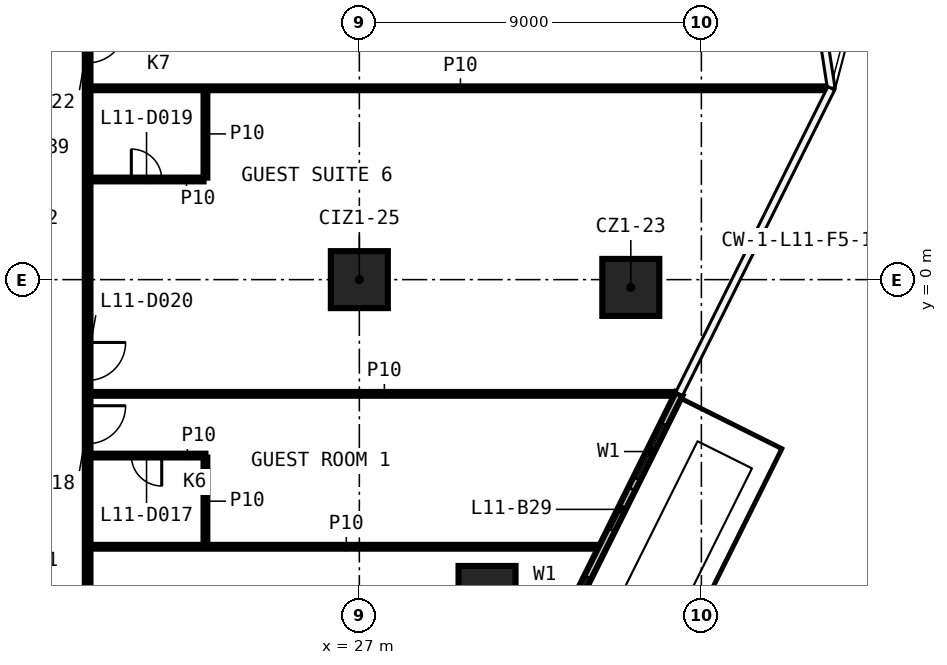
"""IFC4 building model, lengths in metres.
Left out: names, types, materials, properties, quantities, classifications, styles, units other than length and angle.
Written with IfcOpenShell. Run it as: python <this file> out.ifc"""

import sys

from ifc_helpers import new_model, si_unit, direction, frame, frame_2d, origin, origin_2d, place, context, subcontext, project, spatial, rectangle, extrude, element, fill, save


model = new_model("IFC4")
c1 = context("Model", 3, precision=1e-05, world=origin(), true_north=direction((0.0, 1.0)))
c2 = subcontext(c1, "Body", "Model", "MODEL_VIEW")
j1 = project(units=[si_unit("LENGTHUNIT", "METRE"), si_unit("PLANEANGLEUNIT", "RADIAN")], contexts=[c1])
p1 = place(None, origin())
s1 = spatial("IfcSite", under=j1, at=p1, CompositionType="ELEMENT")
p2 = place(p1, origin())
s2 = spatial("IfcBuilding", under=s1, at=p2, CompositionType="ELEMENT")
p3 = place(p2, frame((0.0, 0.0, 62.5)))
s3 = spatial("IfcBuildingStorey", under=s2, at=p3, CompositionType="ELEMENT", Elevation=62.5)
for number, where, z_axis, x_axis in (
    (1, (34.143, -0.205, 0.0), (0.0, 0.0, 1.0), (1.0, 0.0, 0.0)),
    (2, (30.36, -8.284, 0.0), (0.0, 0.0, 1.0), (1.0, 0.0, 0.0)),
    (3, (27.0, 0.0, 0.0), (0.0, 0.0, 1.0), (1.0, 0.0, 0.0)),
):
    element("IfcColumn", number, at=place(p3, frame(where, z_axis=z_axis, x_axis=x_axis)), inside=s3, PredefinedType="COLUMN", context=c2, shape_type="SweptSolid", body=[
        extrude(rectangle(XDim=1.5, YDim=1.5, at=origin_2d()), origin(), (0.0, 0.0, 1.0), 3.3),
    ])
p4 = place(p3, frame((19.925, -7.03, 0.0), z_axis=(0.0, 0.0, 1.0), x_axis=(1.0, 0.0, 0.0)))
e4 = element("IfcWall", 4, at=p4, inside=s3, PredefinedType="PARTITIONING", context=c2, shape_type="SweptSolid", body=[
    extrude(rectangle(XDim=13.464, YDim=0.1, at=frame_2d((6.732, 0.0))), origin(), (0.0, 0.0, 1.0), 3.3),
])
p5 = place(p3, frame((22.95, -4.63, 0.0), z_axis=(0.0, 0.0, 1.0), x_axis=(-1.0, 0.0, 0.0)))
e5 = element("IfcWall", 5, at=p5, inside=s3, PredefinedType="PARTITIONING", context=c2, shape_type="SweptSolid", body=[
    extrude(rectangle(XDim=3.025, YDim=0.1, at=frame_2d((1.512, 0.0))), origin(), (0.0, 0.0, 1.0), 3.3),
])
p6 = place(p5, frame((1.15, 0.0, 0.0)))
e6 = element("IfcOpeningElement", 6, at=p6, cuts=e5, PredefinedType="OPENING", context=c2, shape_type="SweptSolid", body=[
    extrude(rectangle(XDim=0.8, YDim=2.1, at=frame_2d((0.4, 1.05))), frame((0.0, 0.06, 0.0), z_axis=(0.0, -1.0, 0.0), x_axis=(1.0, 0.0, 0.0)), (0.0, 0.0, 1.0), 0.12),
])
p7 = place(p3, frame((19.925, -3.006, 0.0), z_axis=(0.0, 0.0, 1.0), x_axis=(1.0, 0.0, 0.0)))
e7 = element("IfcWall", 7, at=p7, inside=s3, PredefinedType="PARTITIONING", context=c2, shape_type="SweptSolid", body=[
    extrude(rectangle(XDim=15.467, YDim=0.1, at=frame_2d((7.733, 0.0))), origin(), (0.0, 0.0, 1.0), 3.3),
])
p8 = place(p3, frame((19.925, 2.635, 0.0), z_axis=(0.0, 0.0, 1.0), x_axis=(1.0, 0.0, 0.0)))
e8 = element("IfcWall", 8, at=p8, inside=s3, PredefinedType="PARTITIONING", context=c2, shape_type="SweptSolid", body=[
    extrude(rectangle(XDim=2.975, YDim=0.1, at=frame_2d((1.487, 0.0))), origin(), (0.0, 0.0, 1.0), 3.3),
])
p9 = place(p8, frame((1.075, 0.0, 0.0)))
e9 = element("IfcOpeningElement", 9, at=p9, cuts=e8, PredefinedType="OPENING", context=c2, shape_type="SweptSolid", body=[
    extrude(rectangle(XDim=0.8, YDim=2.1, at=frame_2d((0.4, 1.05))), frame((0.0, 0.06, 0.0), z_axis=(0.0, -1.0, 0.0), x_axis=(1.0, 0.0, 0.0)), (0.0, 0.0, 1.0), 0.12),
])
p10 = place(p3, frame((19.925, 5.035, 0.0), z_axis=(0.0, 0.0, 1.0), x_axis=(1.0, 0.0, 0.0)))
e10 = element("IfcWall", 10, at=p10, inside=s3, PredefinedType="PARTITIONING", context=c2, shape_type="SweptSolid", body=[
    extrude(rectangle(XDim=19.47, YDim=0.1, at=frame_2d((9.735, 0.0))), origin(), (0.0, 0.0, 1.0), 3.3),
])
p11 = place(p3, frame((22.95, -6.98, 0.0), z_axis=(0.0, 0.0, 1.0), x_axis=(0.0, 1.0, 0.0)))
e11 = element("IfcWall", 11, at=p11, inside=s3, PredefinedType="PARTITIONING", context=c2, shape_type="SweptSolid", body=[
    extrude(rectangle(XDim=2.3, YDim=0.1, at=frame_2d((1.15, 0.0))), origin(), (0.0, 0.0, 1.0), 3.3),
])
p12 = place(p3, frame((22.95, 2.685, 0.0), z_axis=(0.0, 0.0, 1.0), x_axis=(0.0, 1.0, 0.0)))
e12 = element("IfcWall", 12, at=p12, inside=s3, PredefinedType="PARTITIONING", context=c2, shape_type="SweptSolid", body=[
    extrude(rectangle(XDim=2.3, YDim=0.1, at=frame_2d((1.15, 0.0))), origin(), (0.0, 0.0, 1.0), 3.3),
])
p13 = place(p3, frame((19.85, 16.775, 0.0), z_axis=(0.0, 0.0, 1.0), x_axis=(0.0, -1.0, 0.0)))
e13 = element("IfcWall", 13, at=p13, inside=s3, PredefinedType="PARTITIONING", context=c2, shape_type="SweptSolid", body=[
    extrude(rectangle(XDim=33.55, YDim=0.15, at=frame_2d((16.775, 0.0))), origin(), (0.0, 0.0, 1.0), 3.3),
])
p14 = place(p13, frame((32.158, 0.0, 0.0)))
e14 = element("IfcOpeningElement", 14, at=p14, cuts=e13, PredefinedType="OPENING", context=c2, shape_type="SweptSolid", body=[
    extrude(rectangle(XDim=1.0, YDim=2.1, at=frame_2d((0.5, 1.05))), frame((0.0, 0.085, 0.0), z_axis=(0.0, -1.0, 0.0), x_axis=(1.0, 0.0, 0.0)), (0.0, 0.0, 1.0), 0.17),
])
p15 = place(p13, frame((20.094, 0.0, 0.0)))
e15 = element("IfcOpeningElement", 15, at=p15, cuts=e13, PredefinedType="OPENING", context=c2, shape_type="SweptSolid", body=[
    extrude(rectangle(XDim=1.0, YDim=2.1, at=frame_2d((0.5, 1.05))), frame((0.0, 0.085, 0.0), z_axis=(0.0, -1.0, 0.0), x_axis=(1.0, 0.0, 0.0)), (0.0, 0.0, 1.0), 0.17),
])
p16 = place(p13, frame((18.428, 0.0, 0.0)))
e16 = element("IfcOpeningElement", 16, at=p16, cuts=e13, PredefinedType="OPENING", context=c2, shape_type="SweptSolid", body=[
    extrude(rectangle(XDim=1.0, YDim=2.1, at=frame_2d((0.5, 1.05))), frame((0.0, 0.085, 0.0), z_axis=(0.0, -1.0, 0.0), x_axis=(1.0, 0.0, 0.0)), (0.0, 0.0, 1.0), 0.17),
])
p17 = place(p13, frame((10.072, 0.0, 0.0)))
e17 = element("IfcOpeningElement", 17, at=p17, cuts=e13, PredefinedType="OPENING", context=c2, shape_type="SweptSolid", body=[
    extrude(rectangle(XDim=1.0, YDim=2.1, at=frame_2d((0.5, 1.05))), frame((0.0, 0.085, 0.0), z_axis=(0.0, -1.0, 0.0), x_axis=(1.0, 0.0, 0.0)), (0.0, 0.0, 1.0), 0.17),
])
p18 = place(p13, frame((3.156, 0.0, 0.0)))
e18 = element("IfcOpeningElement", 18, at=p18, cuts=e13, PredefinedType="OPENING", context=c2, shape_type="SweptSolid", body=[
    extrude(rectangle(XDim=1.0, YDim=2.1, at=frame_2d((0.5, 1.05))), frame((0.0, 0.085, 0.0), z_axis=(0.0, -1.0, 0.0), x_axis=(1.0, 0.0, 0.0)), (0.0, 0.0, 1.0), 0.17),
])
p19 = place(p3, frame((21.391, -31.175, 0.0), z_axis=(0.0, 0.0, 1.0), x_axis=(0.445673586032, 0.895195539932, 0.0)))
e19 = element("IfcWall", 19, at=p19, inside=s3, PredefinedType="SOLIDWALL", context=c2, shape_type="SweptSolid", body=[
    extrude(rectangle(XDim=31.466, YDim=0.2, at=frame_2d((15.733, 0.0))), origin(), (0.0, 0.0, 1.0), 3.3),
])
p20 = place(p19, frame((2.0, 0.0, 0.6)))
e20 = element("IfcOpeningElement", 20, at=p20, cuts=e19, PredefinedType="OPENING", context=c2, shape_type="SweptSolid", body=[
    extrude(rectangle(XDim=1.6, YDim=2.4, at=frame_2d((0.8, 1.2))), frame((0.0, 0.11, 0.0), z_axis=(0.0, -1.0, 0.0), x_axis=(1.0, 0.0, 0.0)), (0.0, 0.0, 1.0), 0.22),
])
p21 = place(p19, frame((0.5, 0.0, 0.0)))
e21 = element("IfcOpeningElement", 21, at=p21, cuts=e19, PredefinedType="OPENING", context=c2, shape_type="SweptSolid", body=[
    extrude(rectangle(XDim=1.2, YDim=2.4, at=frame_2d((0.6, 1.2))), frame((0.0, 0.11, 0.0), z_axis=(0.0, -1.0, 0.0), x_axis=(1.0, 0.0, 0.0)), (0.0, 0.0, 1.0), 0.22),
])
p22 = place(p19, frame((4.995, 0.0, 0.6)))
e22 = element("IfcOpeningElement", 22, at=p22, cuts=e19, PredefinedType="OPENING", context=c2, shape_type="SweptSolid", body=[
    extrude(rectangle(XDim=1.6, YDim=2.4, at=frame_2d((0.8, 1.2))), frame((0.0, 0.11, 0.0), z_axis=(0.0, -1.0, 0.0), x_axis=(1.0, 0.0, 0.0)), (0.0, 0.0, 1.0), 0.22),
])
p23 = place(p19, frame((7.495, 0.0, 0.0)))
e23 = element("IfcOpeningElement", 23, at=p23, cuts=e19, PredefinedType="OPENING", context=c2, shape_type="SweptSolid", body=[
    extrude(rectangle(XDim=1.2, YDim=2.4, at=frame_2d((0.6, 1.2))), frame((0.0, 0.11, 0.0), z_axis=(0.0, -1.0, 0.0), x_axis=(1.0, 0.0, 0.0)), (0.0, 0.0, 1.0), 0.22),
])
p24 = place(p19, frame((10.99, 0.0, 0.6)))
e24 = element("IfcOpeningElement", 24, at=p24, cuts=e19, PredefinedType="OPENING", context=c2, shape_type="SweptSolid", body=[
    extrude(rectangle(XDim=1.6, YDim=2.4, at=frame_2d((0.8, 1.2))), frame((0.0, 0.11, 0.0), z_axis=(0.0, -1.0, 0.0), x_axis=(1.0, 0.0, 0.0)), (0.0, 0.0, 1.0), 0.22),
])
p25 = place(p19, frame((9.49, 0.0, 0.0)))
e25 = element("IfcOpeningElement", 25, at=p25, cuts=e19, PredefinedType="OPENING", context=c2, shape_type="SweptSolid", body=[
    extrude(rectangle(XDim=1.2, YDim=2.4, at=frame_2d((0.6, 1.2))), frame((0.0, 0.11, 0.0), z_axis=(0.0, -1.0, 0.0), x_axis=(1.0, 0.0, 0.0)), (0.0, 0.0, 1.0), 0.22),
])
p26 = place(p19, frame((13.986, 0.0, 0.6)))
e26 = element("IfcOpeningElement", 26, at=p26, cuts=e19, PredefinedType="OPENING", context=c2, shape_type="SweptSolid", body=[
    extrude(rectangle(XDim=1.6, YDim=2.4, at=frame_2d((0.8, 1.2))), frame((0.0, 0.11, 0.0), z_axis=(0.0, -1.0, 0.0), x_axis=(1.0, 0.0, 0.0)), (0.0, 0.0, 1.0), 0.22),
])
p27 = place(p19, frame((16.085, 0.0, 0.0)))
e27 = element("IfcOpeningElement", 27, at=p27, cuts=e19, PredefinedType="OPENING", context=c2, shape_type="SweptSolid", body=[
    extrude(rectangle(XDim=1.2, YDim=2.4, at=frame_2d((0.6, 1.2))), frame((0.0, 0.11, 0.0), z_axis=(0.0, -1.0, 0.0), x_axis=(1.0, 0.0, 0.0)), (0.0, 0.0, 1.0), 0.22),
])
p28 = place(p19, frame((19.981, 0.0, 0.6)))
e28 = element("IfcOpeningElement", 28, at=p28, cuts=e19, PredefinedType="OPENING", context=c2, shape_type="SweptSolid", body=[
    extrude(rectangle(XDim=1.6, YDim=2.4, at=frame_2d((0.8, 1.2))), frame((0.0, 0.11, 0.0), z_axis=(0.0, -1.0, 0.0), x_axis=(1.0, 0.0, 0.0)), (0.0, 0.0, 1.0), 0.22),
])
p29 = place(p19, frame((18.481, 0.0, 0.0)))
e29 = element("IfcOpeningElement", 29, at=p29, cuts=e19, PredefinedType="OPENING", context=c2, shape_type="SweptSolid", body=[
    extrude(rectangle(XDim=1.2, YDim=2.4, at=frame_2d((0.6, 1.2))), frame((0.0, 0.11, 0.0), z_axis=(0.0, -1.0, 0.0), x_axis=(1.0, 0.0, 0.0)), (0.0, 0.0, 1.0), 0.22),
])
p30 = place(p19, frame((24.476, 0.0, 0.6)))
e30 = element("IfcOpeningElement", 30, at=p30, cuts=e19, PredefinedType="OPENING", context=c2, shape_type="SweptSolid", body=[
    extrude(rectangle(XDim=1.6, YDim=2.4, at=frame_2d((0.8, 1.2))), frame((0.0, 0.11, 0.0), z_axis=(0.0, -1.0, 0.0), x_axis=(1.0, 0.0, 0.0)), (0.0, 0.0, 1.0), 0.22),
])
p31 = place(p19, frame((22.776, 0.0, 0.0)))
e31 = element("IfcOpeningElement", 31, at=p31, cuts=e19, PredefinedType="OPENING", context=c2, shape_type="SweptSolid", body=[
    extrude(rectangle(XDim=1.2, YDim=2.4, at=frame_2d((0.6, 1.2))), frame((0.0, 0.11, 0.0), z_axis=(0.0, -1.0, 0.0), x_axis=(1.0, 0.0, 0.0)), (0.0, 0.0, 1.0), 0.22),
])
p32 = place(p19, frame((28.971, 0.0, 0.6)))
e32 = element("IfcOpeningElement", 32, at=p32, cuts=e19, PredefinedType="OPENING", context=c2, shape_type="SweptSolid", body=[
    extrude(rectangle(XDim=1.6, YDim=2.4, at=frame_2d((0.8, 1.2))), frame((0.0, 0.11, 0.0), z_axis=(0.0, -1.0, 0.0), x_axis=(1.0, 0.0, 0.0)), (0.0, 0.0, 1.0), 0.22),
])
p33 = place(p19, frame((27.471, 0.0, 0.0)))
e33 = element("IfcOpeningElement", 33, at=p33, cuts=e19, PredefinedType="OPENING", context=c2, shape_type="SweptSolid", body=[
    extrude(rectangle(XDim=1.2, YDim=2.4, at=frame_2d((0.6, 1.2))), frame((0.0, 0.11, 0.0), z_axis=(0.0, -1.0, 0.0), x_axis=(1.0, 0.0, 0.0)), (0.0, 0.0, 1.0), 0.22),
])
p34 = place(p6, origin())
e34 = element("IfcDoor", 34, at=p34, inside=s3, OperationType="SINGLE_SWING_LEFT", PredefinedType="DOOR", context=c2, shape_type="SweptSolid", body=[
    extrude(rectangle(XDim=0.8, YDim=2.1, at=frame_2d((0.4, 1.05))), frame((0.0, 0.025, 0.0), z_axis=(0.0, -1.0, 0.0), x_axis=(1.0, 0.0, 0.0)), (0.0, 0.0, 1.0), 0.05),
])
fill(e6, e34)
p35 = place(p15, origin())
e35 = element("IfcDoor", 35, at=p35, inside=s3, OperationType="SINGLE_SWING_RIGHT", PredefinedType="DOOR", context=c2, shape_type="SweptSolid", body=[
    extrude(rectangle(XDim=1.0, YDim=2.1, at=frame_2d((0.5, 1.05))), frame((0.0, 0.025, 0.0), z_axis=(0.0, -1.0, 0.0), x_axis=(1.0, 0.0, 0.0)), (0.0, 0.0, 1.0), 0.05),
])
fill(e15, e35)
p36 = place(p9, origin())
e36 = element("IfcDoor", 36, at=p36, inside=s3, OperationType="SINGLE_SWING_RIGHT", PredefinedType="DOOR", context=c2, shape_type="SweptSolid", body=[
    extrude(rectangle(XDim=0.8, YDim=2.1, at=frame_2d((0.4, 1.05))), frame((0.0, 0.025, 0.0), z_axis=(0.0, -1.0, 0.0), x_axis=(1.0, 0.0, 0.0)), (0.0, 0.0, 1.0), 0.05),
])
fill(e9, e36)
p37 = place(p16, origin())
e37 = element("IfcDoor", 37, at=p37, inside=s3, OperationType="SINGLE_SWING_LEFT", PredefinedType="DOOR", context=c2, shape_type="SweptSolid", body=[
    extrude(rectangle(XDim=1.0, YDim=2.1, at=frame_2d((0.5, 1.05))), frame((0.0, 0.025, 0.0), z_axis=(0.0, -1.0, 0.0), x_axis=(1.0, 0.0, 0.0)), (0.0, 0.0, 1.0), 0.05),
])
fill(e16, e37)
p38 = place(p17, origin())
e38 = element("IfcDoor", 38, at=p38, inside=s3, OperationType="SINGLE_SWING_RIGHT", PredefinedType="DOOR", context=c2, shape_type="SweptSolid", body=[
    extrude(rectangle(XDim=1.0, YDim=2.1, at=frame_2d((0.5, 1.05))), frame((0.0, 0.025, 0.0), z_axis=(0.0, -1.0, 0.0), x_axis=(1.0, 0.0, 0.0)), (0.0, 0.0, 1.0), 0.05),
])
fill(e17, e38)
p39 = place(p30, origin())
e39 = element("IfcWindow", 39, at=p39, inside=s3, PartitioningType="SINGLE_PANEL", PredefinedType="WINDOW", context=c2, shape_type="SweptSolid", body=[
    extrude(rectangle(XDim=1.6, YDim=2.4, at=frame_2d((0.8, 1.2))), frame((0.0, 0.03, 0.0), z_axis=(0.0, -1.0, 0.0), x_axis=(1.0, 0.0, 0.0)), (0.0, 0.0, 1.0), 0.06),
])
fill(e30, e39)
p40 = place(p32, origin())
e40 = element("IfcWindow", 40, at=p40, inside=s3, PartitioningType="SINGLE_PANEL", PredefinedType="WINDOW", context=c2, shape_type="SweptSolid", body=[
    extrude(rectangle(XDim=1.6, YDim=2.4, at=frame_2d((0.8, 1.2))), frame((0.0, 0.03, 0.0), z_axis=(0.0, -1.0, 0.0), x_axis=(1.0, 0.0, 0.0)), (0.0, 0.0, 1.0), 0.06),
])
fill(e32, e40)
p41 = place(p33, origin())
e41 = element("IfcDoor", 41, at=p41, inside=s3, OperationType="SLIDING_TO_LEFT", PredefinedType="DOOR", context=c2, shape_type="SweptSolid", body=[
    extrude(rectangle(XDim=1.2, YDim=2.4, at=frame_2d((0.6, 1.2))), frame((0.0, 0.025, 0.0), z_axis=(0.0, -1.0, 0.0), x_axis=(1.0, 0.0, 0.0)), (0.0, 0.0, 1.0), 0.05),
])
fill(e33, e41)
save(model, sys.argv[1])
